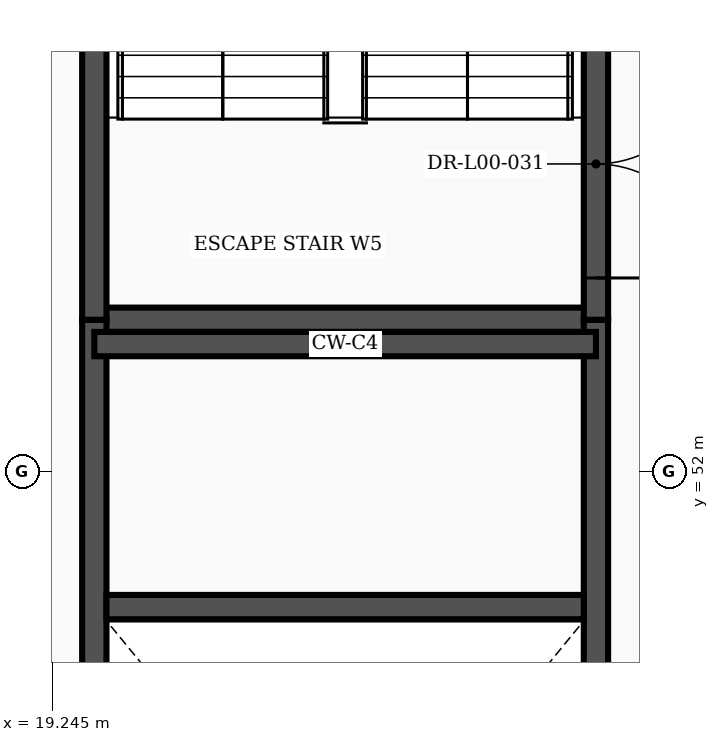
"""IFC4 building model, lengths in metres.
Left out: names, types, materials, properties, quantities, classifications, styles, units other than length and angle.
Written with IfcOpenShell. Run it as: python <this file> out.ifc"""

import sys

from ifc_helpers import new_model, si_unit, direction, frame, frame_2d, origin, place, context, subcontext, project, spatial, rectangle, extrude, element, fill, save


model = new_model("IFC4")
c1 = context("Model", 3, precision=1e-05, world=origin(), true_north=direction((0.0, 1.0)))
c2 = subcontext(c1, "Body", "Model", "MODEL_VIEW")
j1 = project(units=[si_unit("LENGTHUNIT", "METRE"), si_unit("PLANEANGLEUNIT", "RADIAN")], contexts=[c1])
p1 = place(None, origin())
s1 = spatial("IfcSite", under=j1, at=p1, CompositionType="ELEMENT")
p2 = place(p1, origin())
s2 = spatial("IfcBuilding", under=s1, at=p2, CompositionType="ELEMENT")
p3 = place(p2, origin())
s3 = spatial("IfcBuildingStorey", under=s2, at=p3, CompositionType="ELEMENT", Elevation=0.0)
p4 = place(p3, frame((19.8, 54.0, 0.0), z_axis=(0.0, 0.0, 1.0), x_axis=(1.0, 0.0, 0.0)))
e1 = element("IfcWall", 1, at=p4, inside=s3, PredefinedType="SHEAR", context=c2, shape_type="SweptSolid", body=[
    extrude(rectangle(XDim=6.6, YDim=0.32, at=frame_2d((3.3, 0.0))), origin(), (0.0, 0.0, 1.0), 5.75),
])
p5 = place(p3, frame((19.8, 39.4, 0.0), z_axis=(0.0, 0.0, 1.0), x_axis=(0.0, 1.0, 0.0)))
e2 = element("IfcWall", 2, at=p5, inside=s3, PredefinedType="SHEAR", context=c2, shape_type="SweptSolid", body=[
    extrude(rectangle(XDim=14.6, YDim=0.32, at=frame_2d((7.3, 0.0))), origin(), (0.0, 0.0, 1.0), 5.75),
])
p6 = place(p3, frame((26.4, 39.4, 0.0), z_axis=(0.0, 0.0, 1.0), x_axis=(0.0, 1.0, 0.0)))
e3 = element("IfcWall", 3, at=p6, inside=s3, PredefinedType="SHEAR", context=c2, shape_type="SweptSolid", body=[
    extrude(rectangle(XDim=14.6, YDim=0.32, at=frame_2d((7.3, 0.0))), origin(), (0.0, 0.0, 1.0), 5.75),
])
p7 = place(p6, frame((0.55, 0.0, 0.0)))
e4 = element("IfcOpeningElement", 4, at=p7, cuts=e3, PredefinedType="OPENING", context=c2, shape_type="SweptSolid", body=[
    extrude(rectangle(XDim=3.0, YDim=2.25, at=frame_2d((1.5, 1.125))), frame((0.0, 0.172, 0.0), z_axis=(0.0, -1.0, 0.0), x_axis=(1.0, 0.0, 0.0)), (0.0, 0.0, 1.0), 0.344),
])
p8 = place(p3, frame((19.96, 50.22, 0.0), z_axis=(0.0, 0.0, 1.0), x_axis=(1.0, 0.0, 0.0)))
e5 = element("IfcWall", 5, at=p8, inside=s3, PredefinedType="SHEAR", context=c2, shape_type="SweptSolid", body=[
    extrude(rectangle(XDim=6.28, YDim=0.32, at=frame_2d((3.14, 0.0))), origin(), (0.0, 0.0, 1.0), 5.75),
])
p9 = place(p3, frame((19.8, 53.68, 0.0), z_axis=(0.0, 0.0, 1.0), x_axis=(1.0, 0.0, 0.0)))
e6 = element("IfcWall", 6, at=p9, inside=s3, PredefinedType="SHEAR", context=c2, shape_type="SweptSolid", body=[
    extrude(rectangle(XDim=6.6, YDim=0.32, at=frame_2d((3.3, 0.0))), origin(), (0.0, 0.0, 1.0), 5.75),
])
p10 = place(p3, frame((19.8, 54.0, 0.0), z_axis=(0.0, 0.0, 1.0), x_axis=(0.0, 1.0, 0.0)))
e7 = element("IfcWall", 7, at=p10, inside=s3, PredefinedType="SHEAR", context=c2, shape_type="SweptSolid", body=[
    extrude(rectangle(XDim=12.0, YDim=0.32, at=frame_2d((6.0, 0.0))), origin(), (0.0, 0.0, 1.0), 5.75),
])
p11 = place(p3, frame((26.4, 54.0, 0.0), z_axis=(0.0, 0.0, 1.0), x_axis=(0.0, 1.0, 0.0)))
e8 = element("IfcWall", 8, at=p11, inside=s3, PredefinedType="SHEAR", context=c2, shape_type="SweptSolid", body=[
    extrude(rectangle(XDim=12.0, YDim=0.32, at=frame_2d((6.0, 0.0))), origin(), (0.0, 0.0, 1.0), 5.75),
])
p12 = place(p11, frame((0.55, 0.0, 0.0)))
e9 = element("IfcOpeningElement", 9, at=p12, cuts=e8, PredefinedType="OPENING", context=c2, shape_type="SweptSolid", body=[
    extrude(rectangle(XDim=3.0, YDim=2.25, at=frame_2d((1.5, 1.125))), frame((0.0, 0.172, 0.0), z_axis=(0.0, -1.0, 0.0), x_axis=(1.0, 0.0, 0.0)), (0.0, 0.0, 1.0), 0.344),
])
p13 = place(p12, frame((3.0, 0.0, 0.0), z_axis=(0.0, 0.0, 1.0), x_axis=(-1.0, 0.0, 0.0)))
e10 = element("IfcDoor", 10, at=p13, inside=s3, OperationType="DOUBLE_DOOR_SINGLE_SWING", PredefinedType="DOOR", context=c2, shape_type="SweptSolid", body=[
    extrude(rectangle(XDim=3.0, YDim=2.25, at=frame_2d((1.5, 1.125))), frame((0.0, 0.025, 0.0), z_axis=(0.0, -1.0, 0.0), x_axis=(1.0, 0.0, 0.0)), (0.0, 0.0, 1.0), 0.05),
])
fill(e9, e10)
save(model, sys.argv[1])
